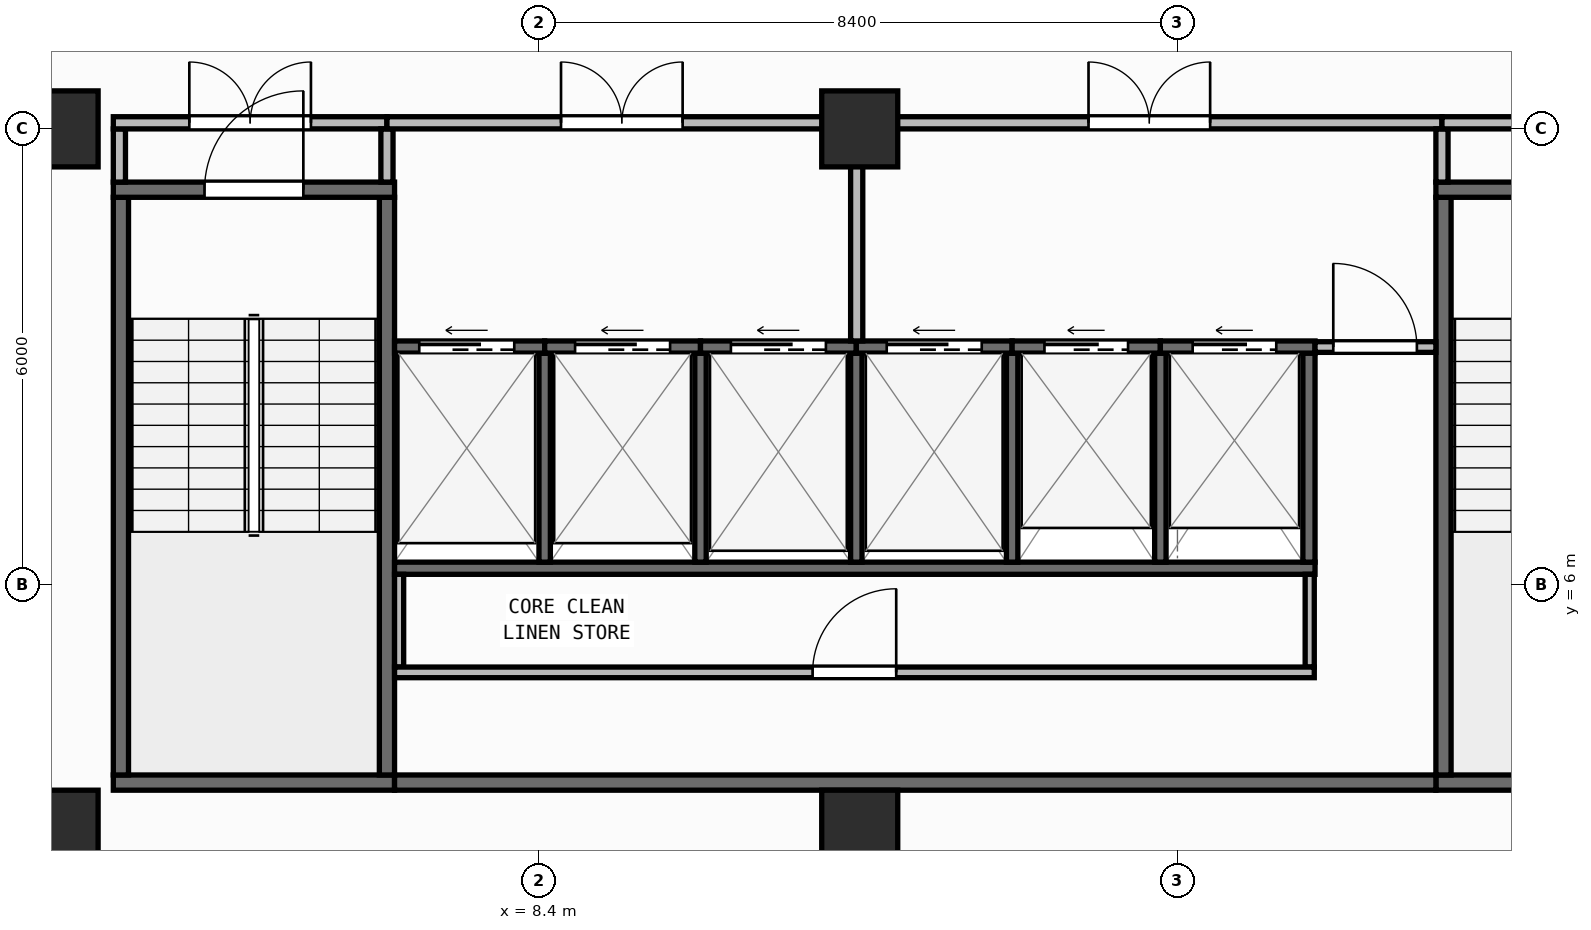
"""IFC4 building model, lengths in metres.
Left out: names, types, materials, properties, quantities, classifications, styles, units other than length and angle.
Written with IfcOpenShell. Run it as: python <this file> out.ifc"""

import sys

from ifc_helpers import new_model, si_unit, direction, frame, frame_2d, origin, origin_2d, place, context, subcontext, project, spatial, rectangle, extrude, element, fill, save


model = new_model("IFC4")
c1 = context("Model", 3, precision=1e-05, world=origin(), true_north=direction((0.0, 1.0)))
c2 = subcontext(c1, "Body", "Model", "MODEL_VIEW")
j1 = project(units=[si_unit("LENGTHUNIT", "METRE"), si_unit("PLANEANGLEUNIT", "RADIAN")], contexts=[c1])
p1 = place(None, origin())
s1 = spatial("IfcSite", under=j1, at=p1, CompositionType="ELEMENT")
p2 = place(p1, origin())
s2 = spatial("IfcBuilding", under=s1, at=p2, CompositionType="ELEMENT")
p3 = place(p2, frame((0.0, 0.0, 227.65)))
s3 = spatial("IfcBuildingStorey", under=s2, at=p3, CompositionType="ELEMENT", Elevation=227.65)
for number, where, z_axis, x_axis in (
    (1, (2.1, 2.8, 0.0), (0.0, 0.0, 1.0), (1.0, 0.0, 0.0)),
    (2, (12.62, 2.8, 0.0), (0.0, 0.0, 1.0), (1.0, 0.0, 0.0)),
    (3, (2.1, 12.0, 0.0), (0.0, 0.0, 1.0), (1.0, 0.0, 0.0)),
    (4, (12.62, 12.0, 0.0), (0.0, 0.0, 1.0), (1.0, 0.0, 0.0)),
):
    element("IfcColumn", number, at=place(p3, frame(where, z_axis=z_axis, x_axis=x_axis)), inside=s3, PredefinedType="COLUMN", context=c2, shape_type="SweptSolid", body=[
        extrude(rectangle(XDim=1.0, YDim=1.0, at=origin_2d()), origin(), (0.0, 0.0, 1.0), 3.95),
    ])
p4 = place(p3, frame((2.66, 0.174, 0.0), z_axis=(0.0, 0.0, 1.0), x_axis=(0.996634028439, 0.081979347142, 0.0)))
e5 = element("IfcWall", 5, at=p4, inside=s3, PredefinedType="STANDARD", context=c2, shape_type="SweptSolid", body=[
    extrude(rectangle(XDim=46.035, YDim=0.26, at=frame_2d((23.018, 0.0))), origin(), (0.0, 0.0, 1.0), 3.71),
])
p5 = place(p4, frame((21.817, 0.0, 0.9)))
e6 = element("IfcOpeningElement", 6, at=p5, cuts=e5, PredefinedType="OPENING", context=c2, shape_type="SweptSolid", body=[
    extrude(rectangle(XDim=2.4, YDim=1.65, at=frame_2d((1.2, 0.825))), frame((0.0, 0.14, 0.0), z_axis=(0.0, -1.0, 0.0), x_axis=(1.0, 0.0, 0.0)), (0.0, 0.0, 1.0), 0.28),
])
p6 = place(p3, frame((2.8, 3.4, 0.0), z_axis=(0.0, 0.0, 1.0), x_axis=(1.0, 0.0, 0.0)))
e7 = element("IfcWall", 7, at=p6, inside=s3, PredefinedType="SHEAR", context=c2, shape_type="SweptSolid", body=[
    extrude(rectangle(XDim=3.7, YDim=0.2, at=frame_2d((1.85, 0.0))), origin(), (0.0, 0.0, 1.0), 3.71),
])
for number, where, z_axis, x_axis in (
    (8, (2.9, 3.5, 0.0), (0.0, 0.0, 1.0), (0.0, 1.0, 0.0)),
    (9, (6.4, 3.5, 0.0), (0.0, 0.0, 1.0), (0.0, 1.0, 0.0)),
):
    element("IfcWall", number, at=place(p3, frame(where, z_axis=z_axis, x_axis=x_axis)), inside=s3, PredefinedType="SHEAR", context=c2, shape_type="SweptSolid", body=[
        extrude(rectangle(XDim=7.6, YDim=0.2, at=frame_2d((3.8, 0.0))), origin(), (0.0, 0.0, 1.0), 3.71),
    ])
p7 = place(p3, frame((2.8, 11.2, 0.0), z_axis=(0.0, 0.0, 1.0), x_axis=(1.0, 0.0, 0.0)))
e10 = element("IfcWall", 10, at=p7, inside=s3, PredefinedType="SHEAR", context=c2, shape_type="SweptSolid", body=[
    extrude(rectangle(XDim=3.7, YDim=0.2, at=frame_2d((1.85, 0.0))), origin(), (0.0, 0.0, 1.0), 3.71),
])
p8 = place(p7, frame((1.2, 0.0, 0.0)))
e11 = element("IfcOpeningElement", 11, at=p8, cuts=e10, PredefinedType="OPENING", context=c2, shape_type="SweptSolid", body=[
    extrude(rectangle(XDim=1.3, YDim=2.15, at=frame_2d((0.65, 1.075))), frame((0.0, 0.11, 0.0), z_axis=(0.0, -1.0, 0.0), x_axis=(1.0, 0.0, 0.0)), (0.0, 0.0, 1.0), 0.22),
])
p9 = place(p3, frame((20.2, 3.4, 0.0), z_axis=(0.0, 0.0, 1.0), x_axis=(1.0, 0.0, 0.0)))
e12 = element("IfcWall", 12, at=p9, inside=s3, PredefinedType="SHEAR", context=c2, shape_type="SweptSolid", body=[
    extrude(rectangle(XDim=3.7, YDim=0.2, at=frame_2d((1.85, 0.0))), origin(), (0.0, 0.0, 1.0), 3.71),
])
p10 = place(p3, frame((20.3, 3.5, 0.0), z_axis=(0.0, 0.0, 1.0), x_axis=(0.0, 1.0, 0.0)))
e13 = element("IfcWall", 13, at=p10, inside=s3, PredefinedType="SHEAR", context=c2, shape_type="SweptSolid", body=[
    extrude(rectangle(XDim=7.6, YDim=0.2, at=frame_2d((3.8, 0.0))), origin(), (0.0, 0.0, 1.0), 3.71),
])
p11 = place(p3, frame((20.2, 11.2, 0.0), z_axis=(0.0, 0.0, 1.0), x_axis=(1.0, 0.0, 0.0)))
e14 = element("IfcWall", 14, at=p11, inside=s3, PredefinedType="SHEAR", context=c2, shape_type="SweptSolid", body=[
    extrude(rectangle(XDim=3.7, YDim=0.2, at=frame_2d((1.85, 0.0))), origin(), (0.0, 0.0, 1.0), 3.71),
])
p12 = place(p11, frame((1.2, 0.0, 0.0)))
e15 = element("IfcOpeningElement", 15, at=p12, cuts=e14, PredefinedType="OPENING", context=c2, shape_type="SweptSolid", body=[
    extrude(rectangle(XDim=1.3, YDim=2.15, at=frame_2d((0.65, 1.075))), frame((0.0, 0.11, 0.0), z_axis=(0.0, -1.0, 0.0), x_axis=(1.0, 0.0, 0.0)), (0.0, 0.0, 1.0), 0.22),
])
p13 = place(p3, frame((6.5, 3.4, 0.0), z_axis=(0.0, 0.0, 1.0), x_axis=(1.0, 0.0, 0.0)))
e16 = element("IfcWall", 16, at=p13, inside=s3, PredefinedType="SHEAR", context=c2, shape_type="SweptSolid", body=[
    extrude(rectangle(XDim=13.7, YDim=0.2, at=frame_2d((6.85, 0.0))), origin(), (0.0, 0.0, 1.0), 3.71),
])
p14 = place(p3, frame((6.5, 6.22, 0.0), z_axis=(0.0, 0.0, 1.0), x_axis=(1.0, 0.0, 0.0)))
e17 = element("IfcWall", 17, at=p14, inside=s3, PredefinedType="SHEAR", context=c2, shape_type="SweptSolid", body=[
    extrude(rectangle(XDim=12.11, YDim=0.16, at=frame_2d((6.055, 0.0))), origin(), (0.0, 0.0, 1.0), 3.71),
])
p15 = place(p3, frame((18.53, 6.3, 0.0), z_axis=(0.0, 0.0, 1.0), x_axis=(0.0, 1.0, 0.0)))
e18 = element("IfcWall", 18, at=p15, inside=s3, PredefinedType="SHEAR", context=c2, shape_type="SweptSolid", body=[
    extrude(rectangle(XDim=2.75, YDim=0.16, at=frame_2d((1.375, 0.0))), origin(), (0.0, 0.0, 1.0), 3.71),
])
for number, where, z_axis, x_axis in (
    (19, (8.475, 6.3, 0.0), (0.0, 0.0, 1.0), (0.0, 1.0, 0.0)),
    (20, (10.525, 6.3, 0.0), (0.0, 0.0, 1.0), (0.0, 1.0, 0.0)),
    (21, (12.575, 6.3, 0.0), (0.0, 0.0, 1.0), (0.0, 1.0, 0.0)),
    (22, (14.625, 6.3, 0.0), (0.0, 0.0, 1.0), (0.0, 1.0, 0.0)),
    (23, (16.575, 6.3, 0.0), (0.0, 0.0, 1.0), (0.0, 1.0, 0.0)),
):
    element("IfcWall", number, at=place(p3, frame(where, z_axis=z_axis, x_axis=x_axis)), inside=s3, PredefinedType="SHEAR", context=c2, shape_type="SweptSolid", body=[
        extrude(rectangle(XDim=2.75, YDim=0.15, at=frame_2d((1.375, 0.0))), origin(), (0.0, 0.0, 1.0), 3.71),
    ])
p16 = place(p3, frame((6.5, 9.13, 0.0), z_axis=(0.0, 0.0, 1.0), x_axis=(1.0, 0.0, 0.0)))
e24 = element("IfcWall", 24, at=p16, inside=s3, PredefinedType="SHEAR", context=c2, shape_type="SweptSolid", body=[
    extrude(rectangle(XDim=1.975, YDim=0.16, at=frame_2d((0.988, 0.0))), origin(), (0.0, 0.0, 1.0), 3.71),
])
p17 = place(p16, frame((0.325, 0.0, 0.0)))
e25 = element("IfcOpeningElement", 25, at=p17, cuts=e24, PredefinedType="OPENING", context=c2, shape_type="SweptSolid", body=[
    extrude(rectangle(XDim=1.25, YDim=2.15, at=frame_2d((0.625, 1.075))), frame((0.0, 0.09, 0.0), z_axis=(0.0, -1.0, 0.0), x_axis=(1.0, 0.0, 0.0)), (0.0, 0.0, 1.0), 0.18),
])
p18 = place(p3, frame((8.475, 9.13, 0.0), z_axis=(0.0, 0.0, 1.0), x_axis=(1.0, 0.0, 0.0)))
e26 = element("IfcWall", 26, at=p18, inside=s3, PredefinedType="SHEAR", context=c2, shape_type="SweptSolid", body=[
    extrude(rectangle(XDim=2.05, YDim=0.16, at=frame_2d((1.025, 0.0))), origin(), (0.0, 0.0, 1.0), 3.71),
])
p19 = place(p18, frame((0.4, 0.0, 0.0)))
e27 = element("IfcOpeningElement", 27, at=p19, cuts=e26, PredefinedType="OPENING", context=c2, shape_type="SweptSolid", body=[
    extrude(rectangle(XDim=1.25, YDim=2.15, at=frame_2d((0.625, 1.075))), frame((0.0, 0.09, 0.0), z_axis=(0.0, -1.0, 0.0), x_axis=(1.0, 0.0, 0.0)), (0.0, 0.0, 1.0), 0.18),
])
p20 = place(p3, frame((10.525, 9.13, 0.0), z_axis=(0.0, 0.0, 1.0), x_axis=(1.0, 0.0, 0.0)))
e28 = element("IfcWall", 28, at=p20, inside=s3, PredefinedType="SHEAR", context=c2, shape_type="SweptSolid", body=[
    extrude(rectangle(XDim=2.05, YDim=0.16, at=frame_2d((1.025, 0.0))), origin(), (0.0, 0.0, 1.0), 3.71),
])
p21 = place(p20, frame((0.4, 0.0, 0.0)))
e29 = element("IfcOpeningElement", 29, at=p21, cuts=e28, PredefinedType="OPENING", context=c2, shape_type="SweptSolid", body=[
    extrude(rectangle(XDim=1.25, YDim=2.15, at=frame_2d((0.625, 1.075))), frame((0.0, 0.09, 0.0), z_axis=(0.0, -1.0, 0.0), x_axis=(1.0, 0.0, 0.0)), (0.0, 0.0, 1.0), 0.18),
])
p22 = place(p3, frame((12.575, 9.13, 0.0), z_axis=(0.0, 0.0, 1.0), x_axis=(1.0, 0.0, 0.0)))
e30 = element("IfcWall", 30, at=p22, inside=s3, PredefinedType="SHEAR", context=c2, shape_type="SweptSolid", body=[
    extrude(rectangle(XDim=2.05, YDim=0.16, at=frame_2d((1.025, 0.0))), origin(), (0.0, 0.0, 1.0), 3.71),
])
p23 = place(p22, frame((0.4, 0.0, 0.0)))
e31 = element("IfcOpeningElement", 31, at=p23, cuts=e30, PredefinedType="OPENING", context=c2, shape_type="SweptSolid", body=[
    extrude(rectangle(XDim=1.25, YDim=2.15, at=frame_2d((0.625, 1.075))), frame((0.0, 0.09, 0.0), z_axis=(0.0, -1.0, 0.0), x_axis=(1.0, 0.0, 0.0)), (0.0, 0.0, 1.0), 0.18),
])
p24 = place(p3, frame((14.625, 9.13, 0.0), z_axis=(0.0, 0.0, 1.0), x_axis=(1.0, 0.0, 0.0)))
e32 = element("IfcWall", 32, at=p24, inside=s3, PredefinedType="SHEAR", context=c2, shape_type="SweptSolid", body=[
    extrude(rectangle(XDim=1.95, YDim=0.16, at=frame_2d((0.975, 0.0))), origin(), (0.0, 0.0, 1.0), 3.71),
])
p25 = place(p24, frame((0.425, 0.0, 0.0)))
e33 = element("IfcOpeningElement", 33, at=p25, cuts=e32, PredefinedType="OPENING", context=c2, shape_type="SweptSolid", body=[
    extrude(rectangle(XDim=1.1, YDim=2.15, at=frame_2d((0.55, 1.075))), frame((0.0, 0.09, 0.0), z_axis=(0.0, -1.0, 0.0), x_axis=(1.0, 0.0, 0.0)), (0.0, 0.0, 1.0), 0.18),
])
p26 = place(p3, frame((16.575, 9.13, 0.0), z_axis=(0.0, 0.0, 1.0), x_axis=(1.0, 0.0, 0.0)))
e34 = element("IfcWall", 34, at=p26, inside=s3, PredefinedType="SHEAR", context=c2, shape_type="SweptSolid", body=[
    extrude(rectangle(XDim=2.035, YDim=0.16, at=frame_2d((1.018, 0.0))), origin(), (0.0, 0.0, 1.0), 3.71),
])
p27 = place(p26, frame((0.425, 0.0, 0.0)))
e35 = element("IfcOpeningElement", 35, at=p27, cuts=e34, PredefinedType="OPENING", context=c2, shape_type="SweptSolid", body=[
    extrude(rectangle(XDim=1.1, YDim=2.15, at=frame_2d((0.55, 1.075))), frame((0.0, 0.09, 0.0), z_axis=(0.0, -1.0, 0.0), x_axis=(1.0, 0.0, 0.0)), (0.0, 0.0, 1.0), 0.18),
])
for number, where, z_axis, x_axis in (
    (36, (6.56, 4.92, 0.0), (0.0, 0.0, 1.0), (0.0, 1.0, 0.0)),
    (37, (18.54, 4.92, 0.0), (0.0, 0.0, 1.0), (0.0, 1.0, 0.0)),
):
    element("IfcWall", number, at=place(p3, frame(where, z_axis=z_axis, x_axis=x_axis)), inside=s3, PredefinedType="PARTITIONING", context=c2, shape_type="SweptSolid", body=[
        extrude(rectangle(XDim=1.22, YDim=0.12, at=frame_2d((0.61, 0.0))), origin(), (0.0, 0.0, 1.0), 3.71),
    ])
p28 = place(p3, frame((6.5, 4.85, 0.0), z_axis=(0.0, 0.0, 1.0), x_axis=(1.0, 0.0, 0.0)))
e38 = element("IfcWall", 38, at=p28, inside=s3, PredefinedType="PARTITIONING", context=c2, shape_type="SweptSolid", body=[
    extrude(rectangle(XDim=12.1, YDim=0.14, at=frame_2d((6.05, 0.0))), origin(), (0.0, 0.0, 1.0), 3.71),
])
p29 = place(p28, frame((5.5, 0.0, 0.0)))
e39 = element("IfcOpeningElement", 39, at=p29, cuts=e38, PredefinedType="OPENING", context=c2, shape_type="SweptSolid", body=[
    extrude(rectangle(XDim=1.1, YDim=2.1, at=frame_2d((0.55, 1.05))), frame((0.0, 0.08, 0.0), z_axis=(0.0, -1.0, 0.0), x_axis=(1.0, 0.0, 0.0)), (0.0, 0.0, 1.0), 0.16),
])
p30 = place(p3, frame((18.61, 9.13, 0.0), z_axis=(0.0, 0.0, 1.0), x_axis=(1.0, 0.0, 0.0)))
e40 = element("IfcWall", 40, at=p30, inside=s3, PredefinedType="PARTITIONING", context=c2, shape_type="SweptSolid", body=[
    extrude(rectangle(XDim=1.59, YDim=0.14, at=frame_2d((0.795, 0.0))), origin(), (0.0, 0.0, 1.0), 3.71),
])
p31 = place(p30, frame((0.24, 0.0, 0.0)))
e41 = element("IfcOpeningElement", 41, at=p31, cuts=e40, PredefinedType="OPENING", context=c2, shape_type="SweptSolid", body=[
    extrude(rectangle(XDim=1.1, YDim=2.1, at=frame_2d((0.55, 1.05))), frame((0.0, 0.08, 0.0), z_axis=(0.0, -1.0, 0.0), x_axis=(1.0, 0.0, 0.0)), (0.0, 0.0, 1.0), 0.16),
])
p32 = place(p3, frame((2.88, 11.3, 0.0), z_axis=(0.0, 0.0, 1.0), x_axis=(0.0, 1.0, 0.0)))
e42 = element("IfcWall", 42, at=p32, inside=s3, PredefinedType="PARTITIONING", context=c2, shape_type="SweptSolid", body=[
    extrude(rectangle(XDim=0.7, YDim=0.16, at=frame_2d((0.35, 0.0))), origin(), (0.0, 0.0, 1.0), 3.71),
])
p33 = place(p3, frame((2.8, 12.08, 0.0), z_axis=(0.0, 0.0, 1.0), x_axis=(1.0, 0.0, 0.0)))
e43 = element("IfcWall", 43, at=p33, inside=s3, PredefinedType="PARTITIONING", context=c2, shape_type="SweptSolid", body=[
    extrude(rectangle(XDim=3.6, YDim=0.16, at=frame_2d((1.8, 0.0))), origin(), (0.0, 0.0, 1.0), 3.152),
])
p34 = place(p33, frame((1.0, 0.0, 0.0)))
e44 = element("IfcOpeningElement", 44, at=p34, cuts=e43, PredefinedType="OPENING", context=c2, shape_type="SweptSolid", body=[
    extrude(rectangle(XDim=1.6, YDim=2.05, at=frame_2d((0.8, 1.025))), frame((0.0, 0.09, 0.0), z_axis=(0.0, -1.0, 0.0), x_axis=(1.0, 0.0, 0.0)), (0.0, 0.0, 1.0), 0.18),
])
p35 = place(p3, frame((6.4, 11.3, 0.0), z_axis=(0.0, 0.0, 1.0), x_axis=(0.0, 1.0, 0.0)))
e45 = element("IfcWall", 45, at=p35, inside=s3, PredefinedType="PARTITIONING", context=c2, shape_type="SweptSolid", body=[
    extrude(rectangle(XDim=0.7, YDim=0.16, at=frame_2d((0.35, 0.0))), origin(), (0.0, 0.0, 1.0), 3.71),
])
p36 = place(p3, frame((6.4, 12.08, 0.0), z_axis=(0.0, 0.0, 1.0), x_axis=(1.0, 0.0, 0.0)))
e46 = element("IfcWall", 46, at=p36, inside=s3, PredefinedType="PARTITIONING", context=c2, shape_type="SweptSolid", body=[
    extrude(rectangle(XDim=6.18, YDim=0.16, at=frame_2d((3.09, 0.0))), origin(), (0.0, 0.0, 1.0), 3.152),
])
p37 = place(p36, frame((2.29, 0.0, 0.0)))
e47 = element("IfcOpeningElement", 47, at=p37, cuts=e46, PredefinedType="OPENING", context=c2, shape_type="SweptSolid", body=[
    extrude(rectangle(XDim=1.6, YDim=2.05, at=frame_2d((0.8, 1.025))), frame((0.0, 0.09, 0.0), z_axis=(0.0, -1.0, 0.0), x_axis=(1.0, 0.0, 0.0)), (0.0, 0.0, 1.0), 0.18),
])
p38 = place(p3, frame((12.58, 9.21, 0.0), z_axis=(0.0, 0.0, 1.0), x_axis=(0.0, 1.0, 0.0)))
e48 = element("IfcWall", 48, at=p38, inside=s3, PredefinedType="PARTITIONING", context=c2, shape_type="SweptSolid", body=[
    extrude(rectangle(XDim=2.79, YDim=0.16, at=frame_2d((1.395, 0.0))), origin(), (0.0, 0.0, 1.0), 3.71),
])
p39 = place(p3, frame((12.58, 12.08, 0.0), z_axis=(0.0, 0.0, 1.0), x_axis=(1.0, 0.0, 0.0)))
e49 = element("IfcWall", 49, at=p39, inside=s3, PredefinedType="PARTITIONING", context=c2, shape_type="SweptSolid", body=[
    extrude(rectangle(XDim=7.7, YDim=0.16, at=frame_2d((3.85, 0.0))), origin(), (0.0, 0.0, 1.0), 3.152),
])
p40 = place(p39, frame((3.05, 0.0, 0.0)))
e50 = element("IfcOpeningElement", 50, at=p40, cuts=e49, PredefinedType="OPENING", context=c2, shape_type="SweptSolid", body=[
    extrude(rectangle(XDim=1.6, YDim=2.05, at=frame_2d((0.8, 1.025))), frame((0.0, 0.09, 0.0), z_axis=(0.0, -1.0, 0.0), x_axis=(1.0, 0.0, 0.0)), (0.0, 0.0, 1.0), 0.18),
])
p41 = place(p3, frame((20.28, 11.3, 0.0), z_axis=(0.0, 0.0, 1.0), x_axis=(0.0, 1.0, 0.0)))
e51 = element("IfcWall", 51, at=p41, inside=s3, PredefinedType="PARTITIONING", context=c2, shape_type="SweptSolid", body=[
    extrude(rectangle(XDim=0.7, YDim=0.16, at=frame_2d((0.35, 0.0))), origin(), (0.0, 0.0, 1.0), 3.71),
])
p42 = place(p3, frame((20.28, 12.08, 0.0), z_axis=(0.0, 0.0, 1.0), x_axis=(1.0, 0.0, 0.0)))
e52 = element("IfcWall", 52, at=p42, inside=s3, PredefinedType="PARTITIONING", context=c2, shape_type="SweptSolid", body=[
    extrude(rectangle(XDim=3.62, YDim=0.16, at=frame_2d((1.81, 0.0))), origin(), (0.0, 0.0, 1.0), 3.152),
])
p43 = place(p42, frame((1.01, 0.0, 0.0)))
e53 = element("IfcOpeningElement", 53, at=p43, cuts=e52, PredefinedType="OPENING", context=c2, shape_type="SweptSolid", body=[
    extrude(rectangle(XDim=1.6, YDim=2.05, at=frame_2d((0.8, 1.025))), frame((0.0, 0.09, 0.0), z_axis=(0.0, -1.0, 0.0), x_axis=(1.0, 0.0, 0.0)), (0.0, 0.0, 1.0), 0.18),
])
p44 = place(p8, origin())
e54 = element("IfcDoor", 54, at=p44, inside=s3, OperationType="SINGLE_SWING_RIGHT", PredefinedType="DOOR", context=c2, shape_type="SweptSolid", body=[
    extrude(rectangle(XDim=1.3, YDim=2.15, at=frame_2d((0.65, 1.075))), frame((0.0, 0.025, 0.0), z_axis=(0.0, -1.0, 0.0), x_axis=(1.0, 0.0, 0.0)), (0.0, 0.0, 1.0), 0.05),
])
fill(e11, e54)
p45 = place(p17, origin())
e55 = element("IfcDoor", 55, at=p45, inside=s3, OperationType="SLIDING_TO_LEFT", PredefinedType="DOOR", context=c2, shape_type="SweptSolid", body=[
    extrude(rectangle(XDim=1.25, YDim=2.15, at=frame_2d((0.625, 1.075))), frame((0.0, 0.025, 0.0), z_axis=(0.0, -1.0, 0.0), x_axis=(1.0, 0.0, 0.0)), (0.0, 0.0, 1.0), 0.05),
])
fill(e25, e55)
p46 = place(p19, origin())
e56 = element("IfcDoor", 56, at=p46, inside=s3, OperationType="SLIDING_TO_LEFT", PredefinedType="DOOR", context=c2, shape_type="SweptSolid", body=[
    extrude(rectangle(XDim=1.25, YDim=2.15, at=frame_2d((0.625, 1.075))), frame((0.0, 0.025, 0.0), z_axis=(0.0, -1.0, 0.0), x_axis=(1.0, 0.0, 0.0)), (0.0, 0.0, 1.0), 0.05),
])
fill(e27, e56)
p47 = place(p21, origin())
e57 = element("IfcDoor", 57, at=p47, inside=s3, OperationType="SLIDING_TO_LEFT", PredefinedType="DOOR", context=c2, shape_type="SweptSolid", body=[
    extrude(rectangle(XDim=1.25, YDim=2.15, at=frame_2d((0.625, 1.075))), frame((0.0, 0.025, 0.0), z_axis=(0.0, -1.0, 0.0), x_axis=(1.0, 0.0, 0.0)), (0.0, 0.0, 1.0), 0.05),
])
fill(e29, e57)
p48 = place(p23, origin())
e58 = element("IfcDoor", 58, at=p48, inside=s3, OperationType="SLIDING_TO_LEFT", PredefinedType="DOOR", context=c2, shape_type="SweptSolid", body=[
    extrude(rectangle(XDim=1.25, YDim=2.15, at=frame_2d((0.625, 1.075))), frame((0.0, 0.025, 0.0), z_axis=(0.0, -1.0, 0.0), x_axis=(1.0, 0.0, 0.0)), (0.0, 0.0, 1.0), 0.05),
])
fill(e31, e58)
p49 = place(p25, origin())
e59 = element("IfcDoor", 59, at=p49, inside=s3, OperationType="SLIDING_TO_LEFT", PredefinedType="DOOR", context=c2, shape_type="SweptSolid", body=[
    extrude(rectangle(XDim=1.1, YDim=2.15, at=frame_2d((0.55, 1.075))), frame((0.0, 0.025, 0.0), z_axis=(0.0, -1.0, 0.0), x_axis=(1.0, 0.0, 0.0)), (0.0, 0.0, 1.0), 0.05),
])
fill(e33, e59)
p50 = place(p27, origin())
e60 = element("IfcDoor", 60, at=p50, inside=s3, OperationType="SLIDING_TO_LEFT", PredefinedType="DOOR", context=c2, shape_type="SweptSolid", body=[
    extrude(rectangle(XDim=1.1, YDim=2.15, at=frame_2d((0.55, 1.075))), frame((0.0, 0.025, 0.0), z_axis=(0.0, -1.0, 0.0), x_axis=(1.0, 0.0, 0.0)), (0.0, 0.0, 1.0), 0.05),
])
fill(e35, e60)
p51 = place(p29, origin())
e61 = element("IfcDoor", 61, at=p51, inside=s3, OperationType="SINGLE_SWING_RIGHT", PredefinedType="DOOR", context=c2, shape_type="SweptSolid", body=[
    extrude(rectangle(XDim=1.1, YDim=2.1, at=frame_2d((0.55, 1.05))), frame((0.0, 0.025, 0.0), z_axis=(0.0, -1.0, 0.0), x_axis=(1.0, 0.0, 0.0)), (0.0, 0.0, 1.0), 0.05),
])
fill(e39, e61)
p52 = place(p31, origin())
e62 = element("IfcDoor", 62, at=p52, inside=s3, OperationType="SINGLE_SWING_LEFT", PredefinedType="DOOR", context=c2, shape_type="SweptSolid", body=[
    extrude(rectangle(XDim=1.1, YDim=2.1, at=frame_2d((0.55, 1.05))), frame((0.0, 0.025, 0.0), z_axis=(0.0, -1.0, 0.0), x_axis=(1.0, 0.0, 0.0)), (0.0, 0.0, 1.0), 0.05),
])
fill(e41, e62)
p53 = place(p34, origin())
e63 = element("IfcDoor", 63, at=p53, inside=s3, OperationType="DOUBLE_DOOR_SINGLE_SWING", PredefinedType="DOOR", context=c2, shape_type="SweptSolid", body=[
    extrude(rectangle(XDim=1.6, YDim=2.05, at=frame_2d((0.8, 1.025))), frame((0.0, 0.025, 0.0), z_axis=(0.0, -1.0, 0.0), x_axis=(1.0, 0.0, 0.0)), (0.0, 0.0, 1.0), 0.05),
])
fill(e44, e63)
p54 = place(p37, origin())
e64 = element("IfcDoor", 64, at=p54, inside=s3, OperationType="DOUBLE_DOOR_SINGLE_SWING", PredefinedType="DOOR", context=c2, shape_type="SweptSolid", body=[
    extrude(rectangle(XDim=1.6, YDim=2.05, at=frame_2d((0.8, 1.025))), frame((0.0, 0.025, 0.0), z_axis=(0.0, -1.0, 0.0), x_axis=(1.0, 0.0, 0.0)), (0.0, 0.0, 1.0), 0.05),
])
fill(e47, e64)
p55 = place(p40, origin())
e65 = element("IfcDoor", 65, at=p55, inside=s3, OperationType="DOUBLE_DOOR_SINGLE_SWING", PredefinedType="DOOR", context=c2, shape_type="SweptSolid", body=[
    extrude(rectangle(XDim=1.6, YDim=2.05, at=frame_2d((0.8, 1.025))), frame((0.0, 0.025, 0.0), z_axis=(0.0, -1.0, 0.0), x_axis=(1.0, 0.0, 0.0)), (0.0, 0.0, 1.0), 0.05),
])
fill(e50, e65)
save(model, sys.argv[1])
